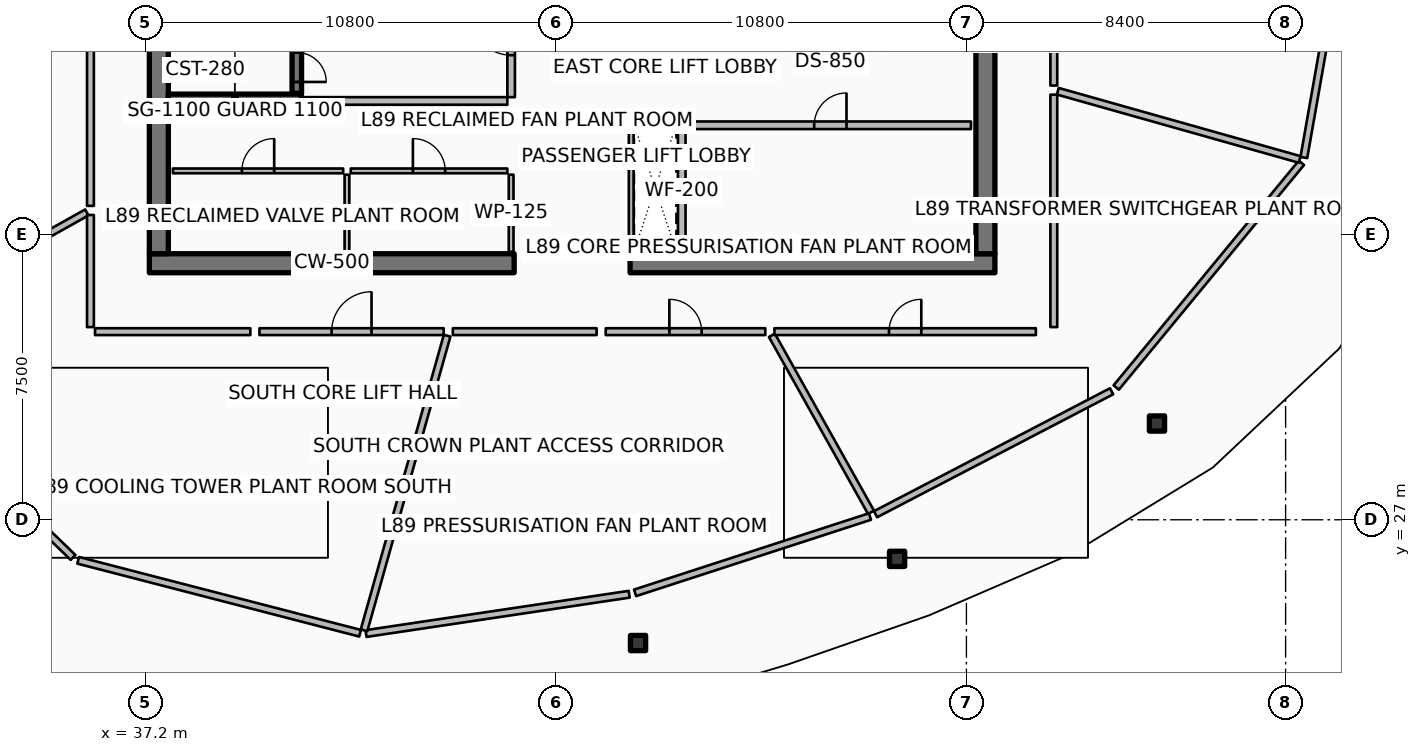
"""IFC4 building model, lengths in metres.
Left out: names, types, materials, properties, quantities, classifications, styles, units other than length and angle.
Written with IfcOpenShell. Run it as: python <this file> out.ifc"""

import sys

from ifc_helpers import new_model, si_unit, direction, frame, frame_2d, origin, origin_2d, place, context, subcontext, project, spatial, rectangle, hollow_rectangle, extrude, element, fill, save


model = new_model("IFC4")
c1 = context("Model", 3, precision=1e-05, world=origin(), true_north=direction((0.0, 1.0)))
c2 = subcontext(c1, "Body", "Model", "MODEL_VIEW")
j1 = project(units=[si_unit("LENGTHUNIT", "METRE"), si_unit("PLANEANGLEUNIT", "RADIAN")], contexts=[c1])
p1 = place(None, origin())
s1 = spatial("IfcSite", under=j1, at=p1, CompositionType="ELEMENT")
p2 = place(p1, origin())
s2 = spatial("IfcBuilding", under=s1, at=p2, CompositionType="ELEMENT")
p3 = place(p2, frame((0.0, 0.0, 356.0)))
s3 = spatial("IfcBuildingStorey", under=s2, at=p3, CompositionType="ELEMENT", Elevation=356.0)
p4 = place(p3, frame((37.3, 33.75, 0.0), z_axis=(0.0, 0.0, 1.0), x_axis=(1.0, 0.0, 0.0)))
e1 = element("IfcWall", 1, at=p4, inside=s3, PredefinedType="SHEAR", context=c2, shape_type="SweptSolid", body=[
    extrude(rectangle(XDim=9.6, YDim=0.5, at=frame_2d((4.8, 0.0))), origin(), (0.0, 0.0, 1.0), 3.6),
])
p5 = place(p3, frame((49.95, 33.75, 0.0), z_axis=(0.0, 0.0, 1.0), x_axis=(1.0, 0.0, 0.0)))
e2 = element("IfcWall", 2, at=p5, inside=s3, PredefinedType="SHEAR", context=c2, shape_type="SweptSolid", body=[
    extrude(rectangle(XDim=9.6, YDim=0.5, at=frame_2d((4.8, 0.0))), origin(), (0.0, 0.0, 1.0), 3.6),
])
for number, where, z_axis, x_axis in (
    (3, (37.55, 34.0, 0.0), (0.0, 0.0, 1.0), (0.0, 1.0, 0.0)),
    (4, (59.3, 34.0, 0.0), (0.0, 0.0, 1.0), (0.0, 1.0, 0.0)),
):
    element("IfcWall", number, at=place(p3, frame(where, z_axis=z_axis, x_axis=x_axis)), inside=s3, PredefinedType="SHEAR", context=c2, shape_type="SweptSolid", body=[
        extrude(rectangle(XDim=16.0, YDim=0.5, at=frame_2d((8.0, 0.0))), origin(), (0.0, 0.0, 1.0), 3.6),
    ])
p6 = place(p3, frame((37.8, 38.06, 0.0), z_axis=(0.0, 0.0, 1.0), x_axis=(1.0, 0.0, 0.0)))
e5 = element("IfcWall", 5, at=p6, inside=s3, PredefinedType="SHEAR", context=c2, shape_type="SweptSolid", body=[
    extrude(rectangle(XDim=3.5, YDim=0.28, at=frame_2d((1.75, 0.0))), origin(), (0.0, 0.0, 1.0), 3.6),
])
for number, where, z_axis, x_axis in (
    (6, (50.159, 23.756, 0.0), (0.0, 0.0, 1.0), (1.0, 0.0, 0.0)),
    (7, (56.977, 25.971, 0.0), (0.0, 0.0, 1.0), (1.0, 0.0, 0.0)),
    (8, (63.815, 29.532, 0.0), (0.0, 0.0, 1.0), (1.0, 0.0, 0.0)),
):
    element("IfcColumn", number, at=place(p3, frame(where, z_axis=z_axis, x_axis=x_axis)), inside=s3, PredefinedType="COLUMN", context=c2, shape_type="SweptSolid", body=[
        extrude(hollow_rectangle(XDim=0.4, YDim=0.4, WallThickness=0.02, InnerFilletRadius=0.02, OuterFilletRadius=0.04, at=origin_2d()), origin(), (0.0, 0.0, 1.0), 3.32),
    ])
p7 = place(p3, frame((41.18, 38.22, 0.0), z_axis=(0.0, 0.0, 1.0), x_axis=(0.0, 1.0, 0.0)))
e9 = element("IfcWall", 9, at=p7, inside=s3, PredefinedType="SOLIDWALL", context=c2, shape_type="SweptSolid", body=[
    extrude(rectangle(XDim=7.56, YDim=0.25, at=frame_2d((3.78, 0.0))), origin(), (0.0, 0.0, 1.0), 3.32),
])
p8 = place(p7, frame((0.3, 0.0, 0.0)))
e10 = element("IfcOpeningElement", 10, at=p8, cuts=e9, PredefinedType="OPENING", context=c2, shape_type="SweptSolid", body=[
    extrude(rectangle(XDim=1.55, YDim=2.15, at=frame_2d((0.775, 1.075))), frame((0.0, 0.135, 0.0), z_axis=(0.0, -1.0, 0.0), x_axis=(1.0, 0.0, 0.0)), (0.0, 0.0, 1.0), 0.27),
])
p9 = place(p3, frame((51.52, 37.38, 0.0), z_axis=(0.0, 0.0, 1.0), x_axis=(1.0, 0.0, 0.0)))
e11 = element("IfcWall", 11, at=p9, inside=s3, PredefinedType="PARTITIONING", context=c2, shape_type="SweptSolid", body=[
    extrude(rectangle(XDim=7.4, YDim=0.2, at=frame_2d((3.7, 0.0))), origin(), (0.0, 0.0, 1.0), 3.32),
])
p10 = place(p9, frame((3.275, 0.0, 0.0)))
e12 = element("IfcOpeningElement", 12, at=p10, cuts=e11, PredefinedType="OPENING", context=c2, shape_type="SweptSolid", body=[
    extrude(rectangle(XDim=0.85, YDim=2.06, at=frame_2d((0.425, 1.03))), frame((0.0, 0.11, 0.0), z_axis=(0.0, -1.0, 0.0), x_axis=(1.0, 0.0, 0.0)), (0.0, 0.0, 1.0), 0.22),
])
p11 = place(p3, frame((51.31, 34.05, 0.0), z_axis=(0.0, 0.0, 1.0), x_axis=(0.0, 1.0, 0.0)))
e13 = element("IfcWall", 13, at=p11, inside=s3, PredefinedType="PARTITIONING", context=c2, shape_type="SweptSolid", body=[
    extrude(rectangle(XDim=3.21, YDim=0.2, at=frame_2d((1.605, 0.0))), origin(), (0.0, 0.0, 1.0), 3.32),
])
for number, where, z_axis, x_axis in (
    (14, (46.82, 34.05, 0.0), (0.0, 0.0, 1.0), (0.0, 1.0, 0.0)),
    (15, (42.5, 34.05, 0.0), (0.0, 0.0, 1.0), (0.0, 1.0, 0.0)),
):
    element("IfcWall", number, at=place(p3, frame(where, z_axis=z_axis, x_axis=x_axis)), inside=s3, PredefinedType="PARTITIONING", context=c2, shape_type="SweptSolid", body=[
        extrude(rectangle(XDim=2.03, YDim=0.125, at=frame_2d((1.015, 0.0))), origin(), (0.0, 0.0, 1.0), 2.76),
    ])
p12 = place(p3, frame((37.92, 36.18, 0.0), z_axis=(0.0, 0.0, 1.0), x_axis=(1.0, 0.0, 0.0)))
e16 = element("IfcWall", 16, at=p12, inside=s3, PredefinedType="PARTITIONING", context=c2, shape_type="SweptSolid", body=[
    extrude(rectangle(XDim=4.48, YDim=0.125, at=frame_2d((2.24, 0.0))), origin(), (0.0, 0.0, 1.0), 2.76),
])
p13 = place(p12, frame((1.815, 0.0, 0.0)))
e17 = element("IfcOpeningElement", 17, at=p13, cuts=e16, PredefinedType="OPENING", context=c2, shape_type="SweptSolid", body=[
    extrude(rectangle(XDim=0.85, YDim=2.06, at=frame_2d((0.425, 1.03))), frame((0.0, 0.073, 0.0), z_axis=(0.0, -1.0, 0.0), x_axis=(1.0, 0.0, 0.0)), (0.0, 0.0, 1.0), 0.145),
])
p14 = place(p3, frame((42.6, 36.18, 0.0), z_axis=(0.0, 0.0, 1.0), x_axis=(1.0, 0.0, 0.0)))
e18 = element("IfcWall", 18, at=p14, inside=s3, PredefinedType="PARTITIONING", context=c2, shape_type="SweptSolid", body=[
    extrude(rectangle(XDim=4.12, YDim=0.125, at=frame_2d((2.06, 0.0))), origin(), (0.0, 0.0, 1.0), 2.76),
])
p15 = place(p14, frame((1.635, 0.0, 0.0)))
e19 = element("IfcOpeningElement", 19, at=p15, cuts=e18, PredefinedType="OPENING", context=c2, shape_type="SweptSolid", body=[
    extrude(rectangle(XDim=0.85, YDim=2.06, at=frame_2d((0.425, 1.03))), frame((0.0, 0.073, 0.0), z_axis=(0.0, -1.0, 0.0), x_axis=(1.0, 0.0, 0.0)), (0.0, 0.0, 1.0), 0.145),
])
p16 = place(p3, frame((41.35, 38.02, 0.0), z_axis=(0.0, 0.0, 1.0), x_axis=(1.0, 0.0, 0.0)))
e20 = element("IfcWall", 20, at=p16, inside=s3, PredefinedType="PARTITIONING", context=c2, shape_type="SweptSolid", body=[
    extrude(rectangle(XDim=5.37, YDim=0.2, at=frame_2d((2.685, 0.0))), origin(), (0.0, 0.0, 1.0), 3.32),
])
p17 = place(p3, frame((46.82, 38.12, 0.0), z_axis=(0.0, 0.0, 1.0), x_axis=(0.0, 1.0, 0.0)))
e21 = element("IfcWall", 21, at=p17, inside=s3, PredefinedType="PARTITIONING", context=c2, shape_type="SweptSolid", body=[
    extrude(rectangle(XDim=3.26, YDim=0.2, at=frame_2d((1.63, 0.0))), origin(), (0.0, 0.0, 1.0), 3.32),
])
p18 = place(p17, frame((1.105, 0.0, 0.0)))
e22 = element("IfcOpeningElement", 22, at=p18, cuts=e21, PredefinedType="OPENING", context=c2, shape_type="SweptSolid", body=[
    extrude(rectangle(XDim=1.05, YDim=2.1, at=frame_2d((0.525, 1.05))), frame((0.0, 0.11, 0.0), z_axis=(0.0, -1.0, 0.0), x_axis=(1.0, 0.0, 0.0)), (0.0, 0.0, 1.0), 0.22),
])
p19 = place(p3, frame((49.98, 34.06, 0.0), z_axis=(0.0, 0.0, 1.0), x_axis=(0.0, 1.0, 0.0)))
e23 = element("IfcWall", 23, at=p19, inside=s3, PredefinedType="PARTITIONING", context=c2, shape_type="SweptSolid", body=[
    extrude(rectangle(XDim=3.4, YDim=0.125, at=frame_2d((1.7, 0.0))), origin(), (0.0, 0.0, 1.0), 2.76),
])
p20 = place(p3, frame((49.98, 37.44, 0.0), z_axis=(0.0, 0.0, 1.0), x_axis=(1.0, 0.0, 0.0)))
e24 = element("IfcWall", 24, at=p20, inside=s3, PredefinedType="PARTITIONING", context=c2, shape_type="SweptSolid", body=[
    extrude(rectangle(XDim=1.26, YDim=0.125, at=frame_2d((0.63, 0.0))), origin(), (0.0, 0.0, 1.0), 2.76),
])
p21 = place(p3, frame((29.533, 31.57, 0.0), z_axis=(0.0, 0.0, 1.0), x_axis=(0.719364153135, -0.694633151516, 0.0)))
e25 = element("IfcWall", 25, at=p21, inside=s3, PredefinedType="PARTITIONING", context=c2, shape_type="SweptSolid", body=[
    extrude(rectangle(XDim=8.006, YDim=0.18, at=frame_2d((4.003, 0.0))), origin(), (0.0, 0.0, 1.0), 2.76),
])
p22 = place(p3, frame((35.427, 25.934, 0.0), z_axis=(0.0, 0.0, 1.0), x_axis=(0.968117205342, -0.250497658115, 0.0)))
e26 = element("IfcWall", 26, at=p22, inside=s3, PredefinedType="PARTITIONING", context=c2, shape_type="SweptSolid", body=[
    extrude(rectangle(XDim=7.662, YDim=0.18, at=frame_2d((3.831, 0.0))), origin(), (0.0, 0.0, 1.0), 2.76),
])
p23 = place(p3, frame((43.001, 24.006, 0.0), z_axis=(0.0, 0.0, 1.0), x_axis=(0.989034336252, 0.147685753256, 0.0)))
e27 = element("IfcWall", 27, at=p23, inside=s3, PredefinedType="PARTITIONING", context=c2, shape_type="SweptSolid", body=[
    extrude(rectangle(XDim=7.003, YDim=0.18, at=frame_2d((3.501, 0.0))), origin(), (0.0, 0.0, 1.0), 2.76),
])
p24 = place(p3, frame((50.082, 25.077, 0.0), z_axis=(0.0, 0.0, 1.0), x_axis=(0.95105283999, 0.309028308649, 0.0)))
e28 = element("IfcWall", 28, at=p24, inside=s3, PredefinedType="PARTITIONING", context=c2, shape_type="SweptSolid", body=[
    extrude(rectangle(XDim=6.499, YDim=0.18, at=frame_2d((3.25, 0.0))), origin(), (0.0, 0.0, 1.0), 2.76),
])
p25 = place(p3, frame((56.41, 27.147, 0.0), z_axis=(0.0, 0.0, 1.0), x_axis=(0.886949494865, 0.461866423935, 0.0)))
e29 = element("IfcWall", 29, at=p25, inside=s3, PredefinedType="PARTITIONING", context=c2, shape_type="SweptSolid", body=[
    extrude(rectangle(XDim=7.002, YDim=0.18, at=frame_2d((3.501, 0.0))), origin(), (0.0, 0.0, 1.0), 2.76),
])
p26 = place(p3, frame((62.742, 30.48, 0.0), z_axis=(0.0, 0.0, 1.0), x_axis=(0.636018833443, 0.771673534278, 0.0)))
e30 = element("IfcWall", 30, at=p26, inside=s3, PredefinedType="PARTITIONING", context=c2, shape_type="SweptSolid", body=[
    extrude(rectangle(XDim=7.661, YDim=0.18, at=frame_2d((3.831, 0.0))), origin(), (0.0, 0.0, 1.0), 2.76),
])
p27 = place(p3, frame((67.68, 36.532, 0.0), z_axis=(0.0, 0.0, 1.0), x_axis=(0.173668776466, 0.984804120666, 0.0)))
e31 = element("IfcWall", 31, at=p27, inside=s3, PredefinedType="PARTITIONING", context=c2, shape_type="SweptSolid", body=[
    extrude(rectangle(XDim=8.006, YDim=0.18, at=frame_2d((4.003, 0.0))), origin(), (0.0, 0.0, 1.0), 2.76),
])
p28 = place(p3, frame((35.75, 40.43, 0.0), z_axis=(0.0, 0.0, 1.0), x_axis=(0.0, -1.0, 0.0)))
e32 = element("IfcWall", 32, at=p28, inside=s3, PredefinedType="PARTITIONING", context=c2, shape_type="SweptSolid", body=[
    extrude(rectangle(XDim=5.17, YDim=0.18, at=frame_2d((2.585, 0.0))), origin(), (0.0, 0.0, 1.0), 2.76),
])
p29 = place(p3, frame((35.654, 35.086, 0.0), z_axis=(0.0, 0.0, 1.0), x_axis=(-0.872497667023, -0.488618277432, 0.0)))
e33 = element("IfcWall", 33, at=p29, inside=s3, PredefinedType="PARTITIONING", context=c2, shape_type="SweptSolid", body=[
    extrude(rectangle(XDim=6.981, YDim=0.18, at=frame_2d((3.491, 0.0))), origin(), (0.0, 0.0, 1.0), 2.76),
])
p30 = place(p3, frame((35.75, 35.02, 0.0), z_axis=(0.0, 0.0, 1.0), x_axis=(0.0, -1.0, 0.0)))
e34 = element("IfcWall", 34, at=p30, inside=s3, PredefinedType="PARTITIONING", context=c2, shape_type="SweptSolid", body=[
    extrude(rectangle(XDim=2.95, YDim=0.18, at=frame_2d((1.475, 0.0))), origin(), (0.0, 0.0, 1.0), 2.76),
])
p31 = place(p3, frame((35.87, 31.95, 0.0), z_axis=(0.0, 0.0, 1.0), x_axis=(1.0, 0.0, 0.0)))
e35 = element("IfcWall", 35, at=p31, inside=s3, PredefinedType="PARTITIONING", context=c2, shape_type="SweptSolid", body=[
    extrude(rectangle(XDim=4.087, YDim=0.18, at=frame_2d((2.043, 0.0))), origin(), (0.0, 0.0, 1.0), 2.76),
])
p32 = place(p3, frame((40.197, 31.95, 0.0), z_axis=(0.0, 0.0, 1.0), x_axis=(1.0, 0.0, 0.0)))
e36 = element("IfcWall", 36, at=p32, inside=s3, PredefinedType="PARTITIONING", context=c2, shape_type="SweptSolid", body=[
    extrude(rectangle(XDim=4.848, YDim=0.18, at=frame_2d((2.424, 0.0))), origin(), (0.0, 0.0, 1.0), 2.76),
])
p33 = place(p32, frame((1.899, 0.0, 0.0)))
e37 = element("IfcOpeningElement", 37, at=p33, cuts=e36, PredefinedType="OPENING", context=c2, shape_type="SweptSolid", body=[
    extrude(rectangle(XDim=1.05, YDim=2.1, at=frame_2d((0.525, 1.05))), frame((0.0, 0.1, 0.0), z_axis=(0.0, -1.0, 0.0), x_axis=(1.0, 0.0, 0.0)), (0.0, 0.0, 1.0), 0.2),
])
p34 = place(p3, frame((45.136, 31.844, 0.0), z_axis=(0.0, 0.0, 1.0), x_axis=(-0.271457285698, -0.962450488099, 0.0)))
e38 = element("IfcWall", 38, at=p34, inside=s3, PredefinedType="PARTITIONING", context=c2, shape_type="SweptSolid", body=[
    extrude(rectangle(XDim=8.056, YDim=0.18, at=frame_2d((4.028, 0.0))), origin(), (0.0, 0.0, 1.0), 2.76),
])
p35 = place(p3, frame((45.286, 31.95, 0.0), z_axis=(0.0, 0.0, 1.0), x_axis=(1.0, 0.0, 0.0)))
e39 = element("IfcWall", 39, at=p35, inside=s3, PredefinedType="PARTITIONING", context=c2, shape_type="SweptSolid", body=[
    extrude(rectangle(XDim=3.784, YDim=0.18, at=frame_2d((1.892, 0.0))), origin(), (0.0, 0.0, 1.0), 2.76),
])
p36 = place(p3, frame((49.31, 31.95, 0.0), z_axis=(0.0, 0.0, 1.0), x_axis=(1.0, 0.0, 0.0)))
e40 = element("IfcWall", 40, at=p36, inside=s3, PredefinedType="PARTITIONING", context=c2, shape_type="SweptSolid", body=[
    extrude(rectangle(XDim=4.199, YDim=0.18, at=frame_2d((2.099, 0.0))), origin(), (0.0, 0.0, 1.0), 2.76),
])
p37 = place(p36, frame((1.674, 0.0, 0.0)))
e41 = element("IfcOpeningElement", 41, at=p37, cuts=e40, PredefinedType="OPENING", context=c2, shape_type="SweptSolid", body=[
    extrude(rectangle(XDim=0.85, YDim=2.06, at=frame_2d((0.425, 1.03))), frame((0.0, 0.1, 0.0), z_axis=(0.0, -1.0, 0.0), x_axis=(1.0, 0.0, 0.0)), (0.0, 0.0, 1.0), 0.2),
])
p38 = place(p3, frame((53.682, 31.854, 0.0), z_axis=(0.0, 0.0, 1.0), x_axis=(0.488622869326, -0.872495095443, 0.0)))
e42 = element("IfcWall", 42, at=p38, inside=s3, PredefinedType="PARTITIONING", context=c2, shape_type="SweptSolid", body=[
    extrude(rectangle(XDim=5.337, YDim=0.18, at=frame_2d((2.668, 0.0))), origin(), (0.0, 0.0, 1.0), 2.76),
])
p39 = place(p3, frame((53.748, 31.95, 0.0), z_axis=(0.0, 0.0, 1.0), x_axis=(1.0, 0.0, 0.0)))
e43 = element("IfcWall", 43, at=p39, inside=s3, PredefinedType="PARTITIONING", context=c2, shape_type="SweptSolid", body=[
    extrude(rectangle(XDim=6.88, YDim=0.18, at=frame_2d((3.44, 0.0))), origin(), (0.0, 0.0, 1.0), 2.76),
])
p40 = place(p39, frame((3.015, 0.0, 0.0)))
e44 = element("IfcOpeningElement", 44, at=p40, cuts=e43, PredefinedType="OPENING", context=c2, shape_type="SweptSolid", body=[
    extrude(rectangle(XDim=0.85, YDim=2.06, at=frame_2d((0.425, 1.03))), frame((0.0, 0.1, 0.0), z_axis=(0.0, -1.0, 0.0), x_axis=(1.0, 0.0, 0.0)), (0.0, 0.0, 1.0), 0.2),
])
p41 = place(p3, frame((61.1, 32.07, 0.0), z_axis=(0.0, 0.0, 1.0), x_axis=(0.0, 1.0, 0.0)))
e45 = element("IfcWall", 45, at=p41, inside=s3, PredefinedType="PARTITIONING", context=c2, shape_type="SweptSolid", body=[
    extrude(rectangle(XDim=6.115, YDim=0.18, at=frame_2d((3.058, 0.0))), origin(), (0.0, 0.0, 1.0), 2.76),
])
p42 = place(p3, frame((61.206, 38.275, 0.0), z_axis=(0.0, 0.0, 1.0), x_axis=(0.962461547865, -0.271418070294, 0.0)))
e46 = element("IfcWall", 46, at=p42, inside=s3, PredefinedType="PARTITIONING", context=c2, shape_type="SweptSolid", body=[
    extrude(rectangle(XDim=6.612, YDim=0.18, at=frame_2d((3.306, 0.0))), origin(), (0.0, 0.0, 1.0), 2.76),
])
p43 = place(p3, frame((61.1, 38.425, 0.0), z_axis=(0.0, 0.0, 1.0), x_axis=(0.0, 1.0, 0.0)))
e47 = element("IfcWall", 47, at=p43, inside=s3, PredefinedType="PARTITIONING", context=c2, shape_type="SweptSolid", body=[
    extrude(rectangle(XDim=5.005, YDim=0.18, at=frame_2d((2.502, 0.0))), origin(), (0.0, 0.0, 1.0), 2.76),
])
p44 = place(p8, origin())
e48 = element("IfcDoor", 48, at=p44, inside=s3, OperationType="DOUBLE_DOOR_SINGLE_SWING", PredefinedType="DOOR", context=c2, shape_type="SweptSolid", body=[
    extrude(rectangle(XDim=1.55, YDim=2.15, at=frame_2d((0.775, 1.075))), frame((0.0, 0.025, 0.0), z_axis=(0.0, -1.0, 0.0), x_axis=(1.0, 0.0, 0.0)), (0.0, 0.0, 1.0), 0.05),
])
fill(e10, e48)
p45 = place(p10, origin())
e49 = element("IfcDoor", 49, at=p45, inside=s3, OperationType="SINGLE_SWING_RIGHT", PredefinedType="DOOR", context=c2, shape_type="SweptSolid", body=[
    extrude(rectangle(XDim=0.85, YDim=2.06, at=frame_2d((0.425, 1.03))), frame((0.0, 0.025, 0.0), z_axis=(0.0, -1.0, 0.0), x_axis=(1.0, 0.0, 0.0)), (0.0, 0.0, 1.0), 0.05),
])
fill(e12, e49)
p46 = place(p13, origin())
e50 = element("IfcDoor", 50, at=p46, inside=s3, OperationType="SINGLE_SWING_RIGHT", PredefinedType="DOOR", context=c2, shape_type="SweptSolid", body=[
    extrude(rectangle(XDim=0.85, YDim=2.06, at=frame_2d((0.425, 1.03))), frame((0.0, 0.025, 0.0), z_axis=(0.0, -1.0, 0.0), x_axis=(1.0, 0.0, 0.0)), (0.0, 0.0, 1.0), 0.05),
])
fill(e17, e50)
p47 = place(p15, origin())
e51 = element("IfcDoor", 51, at=p47, inside=s3, OperationType="SINGLE_SWING_LEFT", PredefinedType="DOOR", context=c2, shape_type="SweptSolid", body=[
    extrude(rectangle(XDim=0.85, YDim=2.06, at=frame_2d((0.425, 1.03))), frame((0.0, 0.025, 0.0), z_axis=(0.0, -1.0, 0.0), x_axis=(1.0, 0.0, 0.0)), (0.0, 0.0, 1.0), 0.05),
])
fill(e19, e51)
p48 = place(p18, origin())
e52 = element("IfcDoor", 52, at=p48, inside=s3, OperationType="SINGLE_SWING_RIGHT", PredefinedType="DOOR", context=c2, shape_type="SweptSolid", body=[
    extrude(rectangle(XDim=1.05, YDim=2.1, at=frame_2d((0.525, 1.05))), frame((0.0, 0.025, 0.0), z_axis=(0.0, -1.0, 0.0), x_axis=(1.0, 0.0, 0.0)), (0.0, 0.0, 1.0), 0.05),
])
fill(e22, e52)
p49 = place(p33, origin())
e53 = element("IfcDoor", 53, at=p49, inside=s3, OperationType="SINGLE_SWING_RIGHT", PredefinedType="DOOR", context=c2, shape_type="SweptSolid", body=[
    extrude(rectangle(XDim=1.05, YDim=2.1, at=frame_2d((0.525, 1.05))), frame((0.0, 0.025, 0.0), z_axis=(0.0, -1.0, 0.0), x_axis=(1.0, 0.0, 0.0)), (0.0, 0.0, 1.0), 0.05),
])
fill(e37, e53)
p50 = place(p37, origin())
e54 = element("IfcDoor", 54, at=p50, inside=s3, OperationType="SINGLE_SWING_LEFT", PredefinedType="DOOR", context=c2, shape_type="SweptSolid", body=[
    extrude(rectangle(XDim=0.85, YDim=2.06, at=frame_2d((0.425, 1.03))), frame((0.0, 0.025, 0.0), z_axis=(0.0, -1.0, 0.0), x_axis=(1.0, 0.0, 0.0)), (0.0, 0.0, 1.0), 0.05),
])
fill(e41, e54)
p51 = place(p40, origin())
e55 = element("IfcDoor", 55, at=p51, inside=s3, OperationType="SINGLE_SWING_RIGHT", PredefinedType="DOOR", context=c2, shape_type="SweptSolid", body=[
    extrude(rectangle(XDim=0.85, YDim=2.06, at=frame_2d((0.425, 1.03))), frame((0.0, 0.025, 0.0), z_axis=(0.0, -1.0, 0.0), x_axis=(1.0, 0.0, 0.0)), (0.0, 0.0, 1.0), 0.05),
])
fill(e44, e55)
save(model, sys.argv[1])
